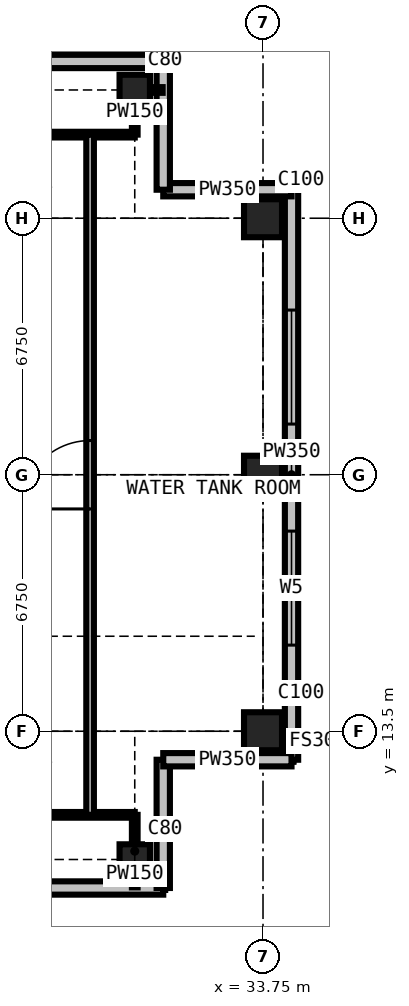
"""IFC4 building model, lengths in metres.
Left out: names, types, materials, properties, quantities, classifications, styles, units other than length and angle.
Written with IfcOpenShell. Run it as: python <this file> out.ifc"""

import sys

from ifc_helpers import new_model, si_unit, direction, frame, frame_2d, origin, origin_2d, place, context, subcontext, project, spatial, rectangle, extrude, element, fill, save


model = new_model("IFC4")
c1 = context("Model", 3, precision=1e-05, world=origin(), true_north=direction((0.0, 1.0)))
c2 = subcontext(c1, "Body", "Model", "MODEL_VIEW")
j1 = project(units=[si_unit("LENGTHUNIT", "METRE"), si_unit("PLANEANGLEUNIT", "RADIAN")], contexts=[c1])
p1 = place(None, origin())
s1 = spatial("IfcSite", under=j1, at=p1, CompositionType="ELEMENT")
p2 = place(p1, origin())
s2 = spatial("IfcBuilding", under=s1, at=p2, CompositionType="ELEMENT")
p3 = place(p2, frame((0.0, 0.0, 254.7)))
s3 = spatial("IfcBuildingStorey", under=s2, at=p3, CompositionType="ELEMENT", Elevation=254.7)
for number, where, z_axis, x_axis in (
    (1, (30.375, 10.125, 0.0), (0.0, 0.0, 1.0), (1.0, 0.0, 0.0)),
    (2, (30.375, 30.375, 0.0), (0.0, 0.0, 1.0), (1.0, 0.0, 0.0)),
):
    element("IfcColumn", number, at=place(p3, frame(where, z_axis=z_axis, x_axis=x_axis)), inside=s3, PredefinedType="COLUMN", context=c2, shape_type="SweptSolid", body=[
        extrude(rectangle(XDim=0.8, YDim=0.8, at=origin_2d()), origin(), (0.0, 0.0, 1.0), 4.5),
    ])
for number, where, z_axis, x_axis in (
    (3, (33.75, 13.5, 0.0), (0.0, 0.0, 1.0), (1.0, 0.0, 0.0)),
    (4, (33.75, 20.25, 0.0), (0.0, 0.0, 1.0), (1.0, 0.0, 0.0)),
    (5, (33.75, 27.0, 0.0), (0.0, 0.0, 1.0), (1.0, 0.0, 0.0)),
):
    element("IfcColumn", number, at=place(p3, frame(where, z_axis=z_axis, x_axis=x_axis)), inside=s3, PredefinedType="COLUMN", context=c2, shape_type="SweptSolid", body=[
        extrude(rectangle(XDim=1.0, YDim=1.0, at=origin_2d()), origin(), (0.0, 0.0, 1.0), 4.5),
    ])
p4 = place(p3, frame((34.5, 12.75, 0.0), z_axis=(0.0, 0.0, 1.0), x_axis=(0.0, 1.0, 0.0)))
e6 = element("IfcWall", 6, at=p4, inside=s3, PredefinedType="SOLIDWALL", context=c2, shape_type="SweptSolid", body=[
    extrude(rectangle(XDim=15.0, YDim=0.35, at=frame_2d((7.5, 0.0))), origin(), (0.0, 0.0, 1.0), 5.6),
])
p5 = place(p4, frame((3.017, 0.0, 0.9)))
e7 = element("IfcOpeningElement", 7, at=p5, cuts=e6, PredefinedType="OPENING", context=c2, shape_type="SweptSolid", body=[
    extrude(rectangle(XDim=3.0, YDim=3.0, at=frame_2d((1.5, 1.5))), frame((0.0, 0.185, 0.0), z_axis=(0.0, -1.0, 0.0), x_axis=(1.0, 0.0, 0.0)), (0.0, 0.0, 1.0), 0.37),
])
p6 = place(p4, frame((8.833, 0.0, 0.9)))
e8 = element("IfcOpeningElement", 8, at=p6, cuts=e6, PredefinedType="OPENING", context=c2, shape_type="SweptSolid", body=[
    extrude(rectangle(XDim=3.0, YDim=3.0, at=frame_2d((1.5, 1.5))), frame((0.0, 0.185, 0.0), z_axis=(0.0, -1.0, 0.0), x_axis=(1.0, 0.0, 0.0)), (0.0, 0.0, 1.0), 0.37),
])
for number, where, z_axis, x_axis in (
    (9, (34.5, 27.75, 0.0), (0.0, 0.0, 1.0), (-1.0, 0.0, 0.0)),
    (10, (31.125, 27.75, 0.0), (0.0, 0.0, 1.0), (0.0, 1.0, 0.0)),
    (11, (31.125, 31.125, 0.0), (0.0, 0.0, 1.0), (-1.0, 0.0, 0.0)),
    (12, (27.75, 9.375, 0.0), (0.0, 0.0, 1.0), (1.0, 0.0, 0.0)),
    (13, (31.125, 9.375, 0.0), (0.0, 0.0, 1.0), (0.0, 1.0, 0.0)),
    (14, (31.125, 12.75, 0.0), (0.0, 0.0, 1.0), (1.0, 0.0, 0.0)),
):
    element("IfcWall", number, at=place(p3, frame(where, z_axis=z_axis, x_axis=x_axis)), inside=s3, PredefinedType="SOLIDWALL", context=c2, shape_type="SweptSolid", body=[
        extrude(rectangle(XDim=3.375, YDim=0.35, at=frame_2d((1.688, 0.0))), origin(), (0.0, 0.0, 1.0), 5.6),
    ])
p7 = place(p3, frame((10.125, 11.3, 0.0), z_axis=(0.0, 0.0, 1.0), x_axis=(1.0, 0.0, 0.0)))
e15 = element("IfcWall", 15, at=p7, inside=s3, PredefinedType="PARTITIONING", context=c2, shape_type="SweptSolid", body=[
    extrude(rectangle(XDim=20.25, YDim=0.15, at=frame_2d((10.125, 0.0))), origin(), (0.0, 0.0, 1.0), 4.15),
])
p8 = place(p7, frame((9.225, 0.0, 0.0)))
e16 = element("IfcOpeningElement", 16, at=p8, cuts=e15, PredefinedType="OPENING", context=c2, shape_type="SweptSolid", body=[
    extrude(rectangle(XDim=1.8, YDim=2.4, at=frame_2d((0.9, 1.2))), frame((0.0, 0.085, 0.0), z_axis=(0.0, -1.0, 0.0), x_axis=(1.0, 0.0, 0.0)), (0.0, 0.0, 1.0), 0.17),
])
p9 = place(p3, frame((11.3, 29.2, 0.0), z_axis=(0.0, 0.0, 1.0), x_axis=(1.0, 0.0, 0.0)))
e17 = element("IfcWall", 17, at=p9, inside=s3, PredefinedType="PARTITIONING", context=c2, shape_type="SweptSolid", body=[
    extrude(rectangle(XDim=19.075, YDim=0.15, at=frame_2d((9.538, 0.0))), origin(), (0.0, 0.0, 1.0), 4.15),
])
p10 = place(p9, frame((9.0, 0.0, 0.0)))
e18 = element("IfcOpeningElement", 18, at=p10, cuts=e17, PredefinedType="OPENING", context=c2, shape_type="SweptSolid", body=[
    extrude(rectangle(XDim=1.8, YDim=2.4, at=frame_2d((0.9, 1.2))), frame((0.0, 0.085, 0.0), z_axis=(0.0, -1.0, 0.0), x_axis=(1.0, 0.0, 0.0)), (0.0, 0.0, 1.0), 0.17),
])
p11 = place(p3, frame((29.2, 11.3, 0.0), z_axis=(0.0, 0.0, 1.0), x_axis=(0.0, 1.0, 0.0)))
e19 = element("IfcWall", 19, at=p11, inside=s3, PredefinedType="PARTITIONING", context=c2, shape_type="SweptSolid", body=[
    extrude(rectangle(XDim=17.9, YDim=0.2, at=frame_2d((8.95, 0.0))), origin(), (0.0, 0.0, 1.0), 4.15),
])
p12 = place(p11, frame((8.05, 0.0, 0.0)))
e20 = element("IfcOpeningElement", 20, at=p12, cuts=e19, PredefinedType="OPENING", context=c2, shape_type="SweptSolid", body=[
    extrude(rectangle(XDim=1.8, YDim=2.4, at=frame_2d((0.9, 1.2))), frame((0.0, 0.11, 0.0), z_axis=(0.0, -1.0, 0.0), x_axis=(1.0, 0.0, 0.0)), (0.0, 0.0, 1.0), 0.22),
])
p13 = place(p3, frame((30.375, 9.391, 0.0), z_axis=(0.0, 0.0, 1.0), x_axis=(0.0, 1.0, 0.0)))
e21 = element("IfcWall", 21, at=p13, inside=s3, PredefinedType="PARTITIONING", context=c2, shape_type="SweptSolid", body=[
    extrude(rectangle(XDim=1.909, YDim=0.15, at=frame_2d((0.955, 0.0))), origin(), (0.0, 0.0, 1.0), 3.652),
])
p14 = place(p3, frame((30.375, 29.2, 0.0), z_axis=(0.0, 0.0, 1.0), x_axis=(0.0, 1.0, 0.0)))
e22 = element("IfcWall", 22, at=p14, inside=s3, PredefinedType="PARTITIONING", context=c2, shape_type="SweptSolid", body=[
    extrude(rectangle(XDim=1.175, YDim=0.15, at=frame_2d((0.587, 0.0))), origin(), (0.0, 0.0, 1.0), 3.652),
])
p15 = place(p3, frame((30.375, 30.375, 0.0), z_axis=(0.0, 0.0, 1.0), x_axis=(1.0, 0.0, 0.0)))
e23 = element("IfcWall", 23, at=p15, inside=s3, PredefinedType="PARTITIONING", context=c2, shape_type="SweptSolid", body=[
    extrude(rectangle(XDim=0.734, YDim=0.15, at=frame_2d((0.367, 0.0))), origin(), (0.0, 0.0, 1.0), 4.15),
])
p16 = place(p5, origin())
e24 = element("IfcWindow", 24, at=p16, inside=s3, PartitioningType="SINGLE_PANEL", PredefinedType="WINDOW", context=c2, shape_type="SweptSolid", body=[
    extrude(rectangle(XDim=3.0, YDim=3.0, at=frame_2d((1.5, 1.5))), frame((0.0, 0.03, 0.0), z_axis=(0.0, -1.0, 0.0), x_axis=(1.0, 0.0, 0.0)), (0.0, 0.0, 1.0), 0.06),
])
fill(e7, e24)
p17 = place(p6, origin())
e25 = element("IfcWindow", 25, at=p17, inside=s3, PartitioningType="SINGLE_PANEL", PredefinedType="WINDOW", context=c2, shape_type="SweptSolid", body=[
    extrude(rectangle(XDim=3.0, YDim=3.0, at=frame_2d((1.5, 1.5))), frame((0.0, 0.03, 0.0), z_axis=(0.0, -1.0, 0.0), x_axis=(1.0, 0.0, 0.0)), (0.0, 0.0, 1.0), 0.06),
])
fill(e8, e25)
p18 = place(p12, origin())
e26 = element("IfcDoor", 26, at=p18, inside=s3, OperationType="DOUBLE_DOOR_SINGLE_SWING", PredefinedType="DOOR", context=c2, shape_type="SweptSolid", body=[
    extrude(rectangle(XDim=1.8, YDim=2.4, at=frame_2d((0.9, 1.2))), frame((0.0, 0.025, 0.0), z_axis=(0.0, -1.0, 0.0), x_axis=(1.0, 0.0, 0.0)), (0.0, 0.0, 1.0), 0.05),
])
fill(e20, e26)
save(model, sys.argv[1])
